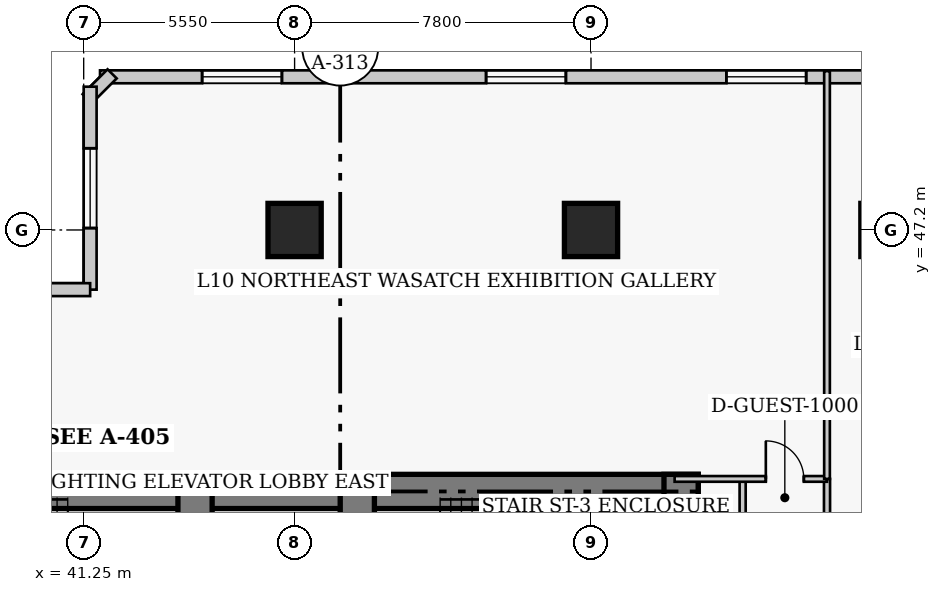
"""IFC4 building model, lengths in metres.
Left out: names, types, materials, properties, quantities, classifications, styles, units other than length and angle.
Written with IfcOpenShell. Run it as: python <this file> out.ifc"""

import sys

from ifc_helpers import new_model, si_unit, direction, frame, frame_2d, origin, origin_2d, place, context, subcontext, project, spatial, rectangle, extrude, element, fill, save


model = new_model("IFC4")
c1 = context("Model", 3, precision=1e-05, world=origin(), true_north=direction((0.0, 1.0)))
c2 = subcontext(c1, "Body", "Model", "MODEL_VIEW")
j1 = project(units=[si_unit("LENGTHUNIT", "METRE"), si_unit("PLANEANGLEUNIT", "RADIAN")], contexts=[c1])
p1 = place(None, origin())
s1 = spatial("IfcSite", under=j1, at=p1, CompositionType="ELEMENT")
p2 = place(p1, origin())
s2 = spatial("IfcBuilding", under=s1, at=p2, CompositionType="ELEMENT")
p3 = place(p2, frame((0.0, 0.0, 45.0)))
s3 = spatial("IfcBuildingStorey", under=s2, at=p3, CompositionType="ELEMENT", Elevation=45.0)
p4 = place(p3, frame((35.85, 40.32, 0.0), z_axis=(0.0, 0.0, 1.0), x_axis=(1.0, 0.0, 0.0)))
e1 = element("IfcWall", 1, at=p4, inside=s3, PredefinedType="SHEAR", context=c2, shape_type="SweptSolid", body=[
    extrude(rectangle(XDim=12.6, YDim=0.9, at=frame_2d((6.3, 0.0))), origin(), (0.0, 0.0, 1.0), 3.8),
])
p5 = place(p3, frame((48.45, 40.32, 0.0), z_axis=(0.0, 0.0, 1.0), x_axis=(1.0, 0.0, 0.0)))
e2 = element("IfcWall", 2, at=p5, inside=s3, PredefinedType="SHEAR", context=c2, shape_type="SweptSolid", body=[
    extrude(rectangle(XDim=8.97, YDim=0.9, at=frame_2d((4.485, 0.0))), origin(), (0.0, 0.0, 1.0), 3.8),
])
p6 = place(p3, frame((56.97, 27.05, 0.0), z_axis=(0.0, 0.0, 1.0), x_axis=(0.0, 1.0, 0.0)))
e3 = element("IfcWall", 3, at=p6, inside=s3, PredefinedType="SHEAR", context=c2, shape_type="SweptSolid", body=[
    extrude(rectangle(XDim=13.72, YDim=0.9, at=frame_2d((6.86, 0.0))), origin(), (0.0, 0.0, 1.0), 3.8),
])
p7 = place(p3, frame((44.18, 36.37, 0.0), z_axis=(0.0, 0.0, 1.0), x_axis=(0.0, 1.0, 0.0)))
e4 = element("IfcWall", 4, at=p7, inside=s3, PredefinedType="SHEAR", context=c2, shape_type="SweptSolid", body=[
    extrude(rectangle(XDim=3.95, YDim=0.9, at=frame_2d((1.975, 0.0))), origin(), (0.0, 0.0, 1.0), 3.8),
])
p8 = place(p3, frame((48.45, 32.3, 0.0), z_axis=(0.0, 0.0, 1.0), x_axis=(0.0, 1.0, 0.0)))
e5 = element("IfcWall", 5, at=p8, inside=s3, PredefinedType="SHEAR", context=c2, shape_type="SweptSolid", body=[
    extrude(rectangle(XDim=8.02, YDim=0.9, at=frame_2d((4.01, 0.0))), origin(), (0.0, 0.0, 1.0), 3.8),
])
p9 = place(p8, frame((5.9, 0.0, 0.0)))
e6 = element("IfcOpeningElement", 6, at=p9, cuts=e5, PredefinedType="OPENING", context=c2, shape_type="SweptSolid", body=[
    extrude(rectangle(XDim=1.1, YDim=2.15, at=frame_2d((0.55, 1.075))), frame((0.0, 0.46, 0.0), z_axis=(0.0, -1.0, 0.0), x_axis=(1.0, 0.0, 0.0)), (0.0, 0.0, 1.0), 0.92),
])
for number, where, z_axis, x_axis in (
    (7, (46.8, 47.2, 0.0), (0.0, 0.0, 1.0), (1.0, 0.0, 0.0)),
    (8, (54.6, 47.2, 0.0), (0.0, 0.0, 1.0), (1.0, 0.0, 0.0)),
):
    element("IfcColumn", number, at=place(p3, frame(where, z_axis=z_axis, x_axis=x_axis)), inside=s3, PredefinedType="COLUMN", context=c2, shape_type="SweptSolid", body=[
        extrude(rectangle(XDim=1.4, YDim=1.4, at=origin_2d()), origin(), (0.0, 0.0, 1.0), 3.8),
    ])
p10 = place(p3, frame((71.57, 51.23, 0.0), z_axis=(0.0, 0.0, 1.0), x_axis=(-1.0, 0.0, 0.0)))
e9 = element("IfcWall", 9, at=p10, inside=s3, PredefinedType="SOLIDWALL", context=c2, shape_type="SweptSolid", body=[
    extrude(rectangle(XDim=29.89, YDim=0.34, at=frame_2d((14.945, 0.0))), origin(), (0.0, 0.0, 1.0), 3.54),
])
p11 = place(p10, frame((2.686, 0.0, 0.85)))
e10 = element("IfcOpeningElement", 10, at=p11, cuts=e9, PredefinedType="OPENING", context=c2, shape_type="SweptSolid", body=[
    extrude(rectangle(XDim=2.1, YDim=1.85, at=frame_2d((1.05, 0.925))), frame((0.0, 0.18, 0.0), z_axis=(0.0, -1.0, 0.0), x_axis=(1.0, 0.0, 0.0)), (0.0, 0.0, 1.0), 0.36),
])
p12 = place(p10, frame((11.309, 0.0, 0.85)))
e11 = element("IfcOpeningElement", 11, at=p12, cuts=e9, PredefinedType="OPENING", context=c2, shape_type="SweptSolid", body=[
    extrude(rectangle(XDim=2.1, YDim=1.85, at=frame_2d((1.05, 0.925))), frame((0.0, 0.18, 0.0), z_axis=(0.0, -1.0, 0.0), x_axis=(1.0, 0.0, 0.0)), (0.0, 0.0, 1.0), 0.36),
])
p13 = place(p10, frame((17.631, 0.0, 0.85)))
e12 = element("IfcOpeningElement", 12, at=p13, cuts=e9, PredefinedType="OPENING", context=c2, shape_type="SweptSolid", body=[
    extrude(rectangle(XDim=2.1, YDim=1.85, at=frame_2d((1.05, 0.925))), frame((0.0, 0.18, 0.0), z_axis=(0.0, -1.0, 0.0), x_axis=(1.0, 0.0, 0.0)), (0.0, 0.0, 1.0), 0.36),
])
p14 = place(p10, frame((25.104, 0.0, 0.85)))
e13 = element("IfcOpeningElement", 13, at=p14, cuts=e9, PredefinedType="OPENING", context=c2, shape_type="SweptSolid", body=[
    extrude(rectangle(XDim=2.1, YDim=1.85, at=frame_2d((1.05, 0.925))), frame((0.0, 0.18, 0.0), z_axis=(0.0, -1.0, 0.0), x_axis=(1.0, 0.0, 0.0)), (0.0, 0.0, 1.0), 0.36),
])
p15 = place(p3, frame((41.999, 51.308, 0.0), z_axis=(0.0, 0.0, 1.0), x_axis=(-0.707238225886, -0.706975312048, 0.0)))
e14 = element("IfcWall", 14, at=p15, inside=s3, PredefinedType="SOLIDWALL", context=c2, shape_type="SweptSolid", body=[
    extrude(rectangle(XDim=0.929, YDim=0.34, at=frame_2d((0.464, 0.0))), origin(), (0.0, 0.0, 1.0), 3.54),
])
p16 = place(p3, frame((41.42, 50.97, 0.0), z_axis=(0.0, 0.0, 1.0), x_axis=(0.0, -1.0, 0.0)))
e15 = element("IfcWall", 15, at=p16, inside=s3, PredefinedType="SOLIDWALL", context=c2, shape_type="SweptSolid", body=[
    extrude(rectangle(XDim=5.34, YDim=0.34, at=frame_2d((2.67, 0.0))), origin(), (0.0, 0.0, 1.0), 3.54),
])
p17 = place(p16, frame((1.62, 0.0, 0.85)))
e16 = element("IfcOpeningElement", 16, at=p17, cuts=e15, PredefinedType="OPENING", context=c2, shape_type="SweptSolid", body=[
    extrude(rectangle(XDim=2.1, YDim=1.85, at=frame_2d((1.05, 0.925))), frame((0.0, 0.18, 0.0), z_axis=(0.0, -1.0, 0.0), x_axis=(1.0, 0.0, 0.0)), (0.0, 0.0, 1.0), 0.36),
])
p18 = place(p3, frame((41.42, 45.63, 0.0), z_axis=(0.0, 0.0, 1.0), x_axis=(-1.0, 0.0, 0.0)))
e17 = element("IfcWall", 17, at=p18, inside=s3, PredefinedType="SOLIDWALL", context=c2, shape_type="SweptSolid", body=[
    extrude(rectangle(XDim=4.84, YDim=0.34, at=frame_2d((2.42, 0.0))), origin(), (0.0, 0.0, 1.0), 3.54),
])
p19 = place(p18, frame((1.37, 0.0, 0.85)))
e18 = element("IfcOpeningElement", 18, at=p19, cuts=e17, PredefinedType="OPENING", context=c2, shape_type="SweptSolid", body=[
    extrude(rectangle(XDim=2.1, YDim=1.85, at=frame_2d((1.05, 0.925))), frame((0.0, 0.18, 0.0), z_axis=(0.0, -1.0, 0.0), x_axis=(1.0, 0.0, 0.0)), (0.0, 0.0, 1.0), 0.36),
])
p20 = place(p3, frame((60.81, 10.25, 0.0), z_axis=(0.0, 0.0, 1.0), x_axis=(0.0, 1.0, 0.0)))
e19 = element("IfcWall", 19, at=p20, inside=s3, PredefinedType="PARTITIONING", context=c2, shape_type="SweptSolid", body=[
    extrude(rectangle(XDim=30.4, YDim=0.16, at=frame_2d((15.2, 0.0))), origin(), (0.0, 0.0, 1.0), 3.54),
])
p21 = place(p20, frame((4.4, 0.0, 0.0)))
e20 = element("IfcOpeningElement", 20, at=p21, cuts=e19, PredefinedType="OPENING", context=c2, shape_type="SweptSolid", body=[
    extrude(rectangle(XDim=0.95, YDim=2.1, at=frame_2d((0.475, 1.05))), frame((0.0, 0.09, 0.0), z_axis=(0.0, -1.0, 0.0), x_axis=(1.0, 0.0, 0.0)), (0.0, 0.0, 1.0), 0.18),
])
p22 = place(p20, frame((13.175, 0.0, 0.0)))
e21 = element("IfcOpeningElement", 21, at=p22, cuts=e19, PredefinedType="OPENING", context=c2, shape_type="SweptSolid", body=[
    extrude(rectangle(XDim=0.95, YDim=2.1, at=frame_2d((0.475, 1.05))), frame((0.0, 0.09, 0.0), z_axis=(0.0, -1.0, 0.0), x_axis=(1.0, 0.0, 0.0)), (0.0, 0.0, 1.0), 0.18),
])
p23 = place(p20, frame((20.975, 0.0, 0.0)))
e22 = element("IfcOpeningElement", 22, at=p23, cuts=e19, PredefinedType="OPENING", context=c2, shape_type="SweptSolid", body=[
    extrude(rectangle(XDim=0.95, YDim=2.1, at=frame_2d((0.475, 1.05))), frame((0.0, 0.09, 0.0), z_axis=(0.0, -1.0, 0.0), x_axis=(1.0, 0.0, 0.0)), (0.0, 0.0, 1.0), 0.18),
])
p24 = place(p20, frame((25.9, 0.0, 0.0)))
e23 = element("IfcOpeningElement", 23, at=p24, cuts=e19, PredefinedType="OPENING", context=c2, shape_type="SweptSolid", body=[
    extrude(rectangle(XDim=1.0, YDim=2.15, at=frame_2d((0.5, 1.075))), frame((0.0, 0.09, 0.0), z_axis=(0.0, -1.0, 0.0), x_axis=(1.0, 0.0, 0.0)), (0.0, 0.0, 1.0), 0.18),
])
p25 = place(p3, frame((58.59, 26.41, 0.0), z_axis=(0.0, 0.0, 1.0), x_axis=(0.0, 1.0, 0.0)))
e24 = element("IfcWall", 24, at=p25, inside=s3, PredefinedType="PARTITIONING", context=c2, shape_type="SweptSolid", body=[
    extrude(rectangle(XDim=14.24, YDim=0.16, at=frame_2d((7.12, 0.0))), origin(), (0.0, 0.0, 1.0), 3.54),
])
p26 = place(p3, frame((56.8, 40.65, 0.0), z_axis=(0.0, 0.0, 1.0), x_axis=(1.0, 0.0, 0.0)))
e25 = element("IfcWall", 25, at=p26, inside=s3, PredefinedType="PARTITIONING", context=c2, shape_type="SweptSolid", body=[
    extrude(rectangle(XDim=4.01, YDim=0.15, at=frame_2d((2.005, 0.0))), origin(), (0.0, 0.0, 1.0), 3.54),
])
p27 = place(p26, frame((2.4, 0.0, 0.0)))
e26 = element("IfcOpeningElement", 26, at=p27, cuts=e25, PredefinedType="OPENING", context=c2, shape_type="SweptSolid", body=[
    extrude(rectangle(XDim=1.0, YDim=2.15, at=frame_2d((0.5, 1.075))), frame((0.0, 0.085, 0.0), z_axis=(0.0, -1.0, 0.0), x_axis=(1.0, 0.0, 0.0)), (0.0, 0.0, 1.0), 0.17),
])
p28 = place(p3, frame((60.81, 40.65, 0.0), z_axis=(0.0, 0.0, 1.0), x_axis=(0.0, 1.0, 0.0)))
e27 = element("IfcWall", 27, at=p28, inside=s3, PredefinedType="PARTITIONING", context=c2, shape_type="SweptSolid", body=[
    extrude(rectangle(XDim=10.73, YDim=0.15, at=frame_2d((5.365, 0.0))), origin(), (0.0, 0.0, 1.0), 3.54),
])
p29 = place(p12, origin())
e28 = element("IfcWindow", 28, at=p29, inside=s3, PartitioningType="SINGLE_PANEL", PredefinedType="WINDOW", context=c2, shape_type="SweptSolid", body=[
    extrude(rectangle(XDim=2.1, YDim=1.85, at=frame_2d((1.05, 0.925))), frame((0.0, 0.03, 0.0), z_axis=(0.0, -1.0, 0.0), x_axis=(1.0, 0.0, 0.0)), (0.0, 0.0, 1.0), 0.06),
])
fill(e11, e28)
p30 = place(p13, origin())
e29 = element("IfcWindow", 29, at=p30, inside=s3, PartitioningType="SINGLE_PANEL", PredefinedType="WINDOW", context=c2, shape_type="SweptSolid", body=[
    extrude(rectangle(XDim=2.1, YDim=1.85, at=frame_2d((1.05, 0.925))), frame((0.0, 0.03, 0.0), z_axis=(0.0, -1.0, 0.0), x_axis=(1.0, 0.0, 0.0)), (0.0, 0.0, 1.0), 0.06),
])
fill(e12, e29)
p31 = place(p14, origin())
e30 = element("IfcWindow", 30, at=p31, inside=s3, PartitioningType="SINGLE_PANEL", PredefinedType="WINDOW", context=c2, shape_type="SweptSolid", body=[
    extrude(rectangle(XDim=2.1, YDim=1.85, at=frame_2d((1.05, 0.925))), frame((0.0, 0.03, 0.0), z_axis=(0.0, -1.0, 0.0), x_axis=(1.0, 0.0, 0.0)), (0.0, 0.0, 1.0), 0.06),
])
fill(e13, e30)
p32 = place(p17, origin())
e31 = element("IfcWindow", 31, at=p32, inside=s3, PartitioningType="SINGLE_PANEL", PredefinedType="WINDOW", context=c2, shape_type="SweptSolid", body=[
    extrude(rectangle(XDim=2.1, YDim=1.85, at=frame_2d((1.05, 0.925))), frame((0.0, 0.03, 0.0), z_axis=(0.0, -1.0, 0.0), x_axis=(1.0, 0.0, 0.0)), (0.0, 0.0, 1.0), 0.06),
])
fill(e16, e31)
p33 = place(p27, origin())
e32 = element("IfcDoor", 32, at=p33, inside=s3, OperationType="SINGLE_SWING_LEFT", PredefinedType="DOOR", context=c2, shape_type="SweptSolid", body=[
    extrude(rectangle(XDim=1.0, YDim=2.15, at=frame_2d((0.5, 1.075))), frame((0.0, 0.025, 0.0), z_axis=(0.0, -1.0, 0.0), x_axis=(1.0, 0.0, 0.0)), (0.0, 0.0, 1.0), 0.05),
])
fill(e26, e32)
save(model, sys.argv[1])
